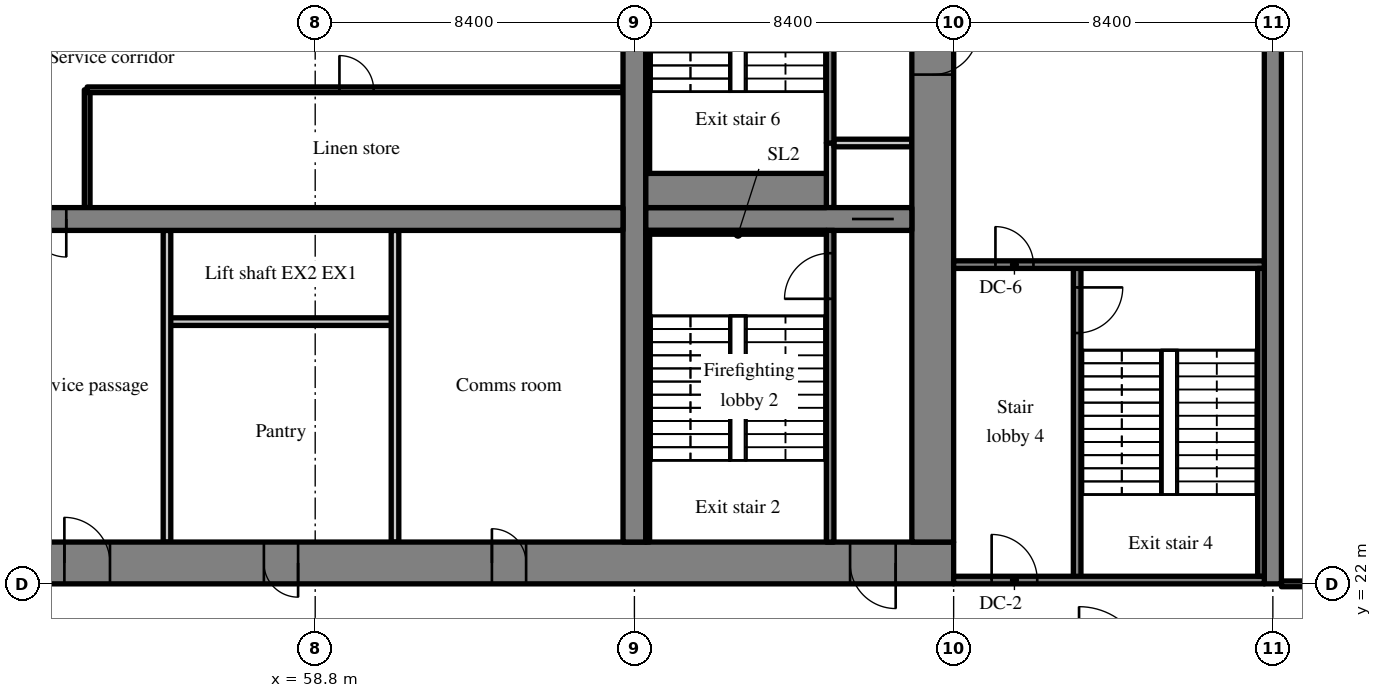
"""IFC4 building model, lengths in metres.
Left out: names, types, materials, properties, quantities, classifications, styles, units other than length and angle.
Written with IfcOpenShell. Run it as: python <this file> out.ifc"""

import sys

from ifc_helpers import new_model, si_unit, direction, frame, frame_2d, origin, place, context, subcontext, project, spatial, rectangle, extrude, source, transform, mapped, element, fill, save


model = new_model("IFC4")
c1 = context("Model", 3, precision=1e-05, world=origin(), true_north=direction((0.0, 1.0)))
c2 = subcontext(c1, "Body", "Model", "MODEL_VIEW")
j1 = project(units=[si_unit("LENGTHUNIT", "METRE"), si_unit("PLANEANGLEUNIT", "RADIAN")], contexts=[c1])
p1 = place(None, origin())
s1 = spatial("IfcSite", under=j1, at=p1, CompositionType="ELEMENT")
p2 = place(p1, origin())
s2 = spatial("IfcBuilding", under=s1, at=p2, CompositionType="ELEMENT")
p3 = place(p2, frame((0.0, 0.0, 23.0)))
s3 = spatial("IfcBuildingStorey", under=s2, at=p3, CompositionType="ELEMENT", Elevation=23.0)
m1 = source(origin(), c2, "Body", "SweptSolid", [
    extrude(rectangle(XDim=50.4, YDim=1.1, at=frame_2d((25.2, 0.0))), origin(), (0.0, 0.0, 1.0), 4.52),
])
p4 = place(p3, frame((25.2, 22.55, 0.0), z_axis=(0.0, 0.0, 1.0), x_axis=(1.0, 0.0, 0.0)))
e1 = element("IfcWall", 1, at=p4, inside=s3, PredefinedType="SHEAR", context=c2, shape_type="MappedRepresentation", body=[
    mapped(m1, transform((0.0, 0.0, 0.0), scale=1.0)),
])
m2 = source(origin(), c2, "Body", "SweptSolid", [
    extrude(rectangle(XDim=1.8, YDim=2.1, at=frame_2d((0.9, 1.05))), frame((0.0, 0.56, 0.0), z_axis=(0.0, -1.0, 0.0), x_axis=(1.0, 0.0, 0.0)), (0.0, 0.0, 1.0), 1.12),
])
p5 = place(p4, frame((15.9, 0.0, 0.0)))
e2 = element("IfcOpeningElement", 2, at=p5, cuts=e1, PredefinedType="OPENING", context=c2, shape_type="MappedRepresentation", body=[
    mapped(m2, transform((0.0, 0.0, 0.0), scale=1.0)),
])
m3 = source(origin(), c2, "Body", "SweptSolid", [
    extrude(rectangle(XDim=1.2, YDim=2.1, at=frame_2d((0.6, 1.05))), frame((0.0, 0.56, 0.0), z_axis=(0.0, -1.0, 0.0), x_axis=(1.0, 0.0, 0.0)), (0.0, 0.0, 1.0), 1.12),
])
p6 = place(p4, frame((27.0, 0.0, 0.0)))
e3 = element("IfcOpeningElement", 3, at=p6, cuts=e1, PredefinedType="OPENING", context=c2, shape_type="MappedRepresentation", body=[
    mapped(m3, transform((0.0, 0.0, 0.0), scale=1.0)),
])
m4 = source(origin(), c2, "Body", "SweptSolid", [
    extrude(rectangle(XDim=0.9, YDim=2.1, at=frame_2d((0.45, 1.05))), frame((0.0, 0.56, 0.0), z_axis=(0.0, -1.0, 0.0), x_axis=(1.0, 0.0, 0.0)), (0.0, 0.0, 1.0), 1.12),
])
p7 = place(p4, frame((32.25, 0.0, 0.0)))
e4 = element("IfcOpeningElement", 4, at=p7, cuts=e1, PredefinedType="OPENING", context=c2, shape_type="MappedRepresentation", body=[
    mapped(m4, transform((0.0, 0.0, 0.0), scale=1.0)),
])
p8 = place(p4, frame((38.25, 0.0, 0.0)))
e5 = element("IfcOpeningElement", 5, at=p8, cuts=e1, PredefinedType="OPENING", context=c2, shape_type="MappedRepresentation", body=[
    mapped(m4, transform((0.0, 0.0, 0.0), scale=1.0)),
])
p9 = place(p4, frame((6.425, 0.0, 0.0)))
e6 = element("IfcOpeningElement", 6, at=p9, cuts=e1, PredefinedType="OPENING", context=c2, shape_type="MappedRepresentation", body=[
    mapped(m3, transform((0.0, 0.0, 0.0), scale=1.0)),
])
p10 = place(p4, frame((47.675, 0.0, 0.0)))
e7 = element("IfcOpeningElement", 7, at=p10, cuts=e1, PredefinedType="OPENING", context=c2, shape_type="MappedRepresentation", body=[
    mapped(m3, transform((0.0, 0.0, 0.0), scale=1.0)),
])
m5 = source(origin(), c2, "Body", "SweptSolid", [
    extrude(rectangle(XDim=17.8, YDim=1.1, at=frame_2d((8.9, 0.0))), origin(), (0.0, 0.0, 1.0), 4.52),
])
p11 = place(p3, frame((75.05, 23.1, 0.0), z_axis=(0.0, 0.0, 1.0), x_axis=(0.0, 1.0, 0.0)))
e8 = element("IfcWall", 8, at=p11, inside=s3, PredefinedType="SHEAR", context=c2, shape_type="MappedRepresentation", body=[
    mapped(m5, transform((0.0, 0.0, 0.0), scale=1.0)),
])
p12 = place(p11, frame((12.3, 0.0, 0.0)))
e9 = element("IfcOpeningElement", 9, at=p12, cuts=e8, PredefinedType="OPENING", context=c2, shape_type="MappedRepresentation", body=[
    mapped(m3, transform((0.0, 0.0, 0.0), scale=1.0)),
])
m6 = source(origin(), c2, "Body", "SweptSolid", [
    extrude(rectangle(XDim=17.8, YDim=0.6, at=frame_2d((8.9, 0.0))), origin(), (0.0, 0.0, 1.0), 4.52),
])
p13 = place(p3, frame((67.2, 23.1, 0.0), z_axis=(0.0, 0.0, 1.0), x_axis=(0.0, 1.0, 0.0)))
e10 = element("IfcWall", 10, at=p13, inside=s3, PredefinedType="SHEAR", context=c2, shape_type="MappedRepresentation", body=[
    mapped(m6, transform((0.0, 0.0, 0.0), scale=1.0)),
])
m7 = source(origin(), c2, "Body", "SweptSolid", [
    extrude(rectangle(XDim=16.2, YDim=0.6, at=frame_2d((8.1, 0.0))), origin(), (0.0, 0.0, 1.0), 4.52),
])
p14 = place(p3, frame((50.7, 31.6, 0.0), z_axis=(0.0, 0.0, 1.0), x_axis=(1.0, 0.0, 0.0)))
e11 = element("IfcWall", 11, at=p14, inside=s3, PredefinedType="SHEAR", context=c2, shape_type="MappedRepresentation", body=[
    mapped(m7, transform((0.0, 0.0, 0.0), scale=1.0)),
])
m8 = source(origin(), c2, "Body", "SweptSolid", [
    extrude(rectangle(XDim=1.0, YDim=2.1, at=frame_2d((0.5, 1.05))), frame((0.0, 0.31, 0.0), z_axis=(0.0, -1.0, 0.0), x_axis=(1.0, 0.0, 0.0)), (0.0, 0.0, 1.0), 0.62),
])
p15 = place(p14, frame((0.55, 0.0, 0.0)))
e12 = element("IfcOpeningElement", 12, at=p15, cuts=e11, PredefinedType="OPENING", context=c2, shape_type="MappedRepresentation", body=[
    mapped(m8, transform((0.0, 0.0, 0.0), scale=1.0)),
])
m9 = source(origin(), c2, "Body", "SweptSolid", [
    extrude(rectangle(XDim=7.0, YDim=0.6, at=frame_2d((3.5, 0.0))), origin(), (0.0, 0.0, 1.0), 4.52),
])
p16 = place(p3, frame((67.5, 31.6, 0.0), z_axis=(0.0, 0.0, 1.0), x_axis=(1.0, 0.0, 0.0)))
e13 = element("IfcWall", 13, at=p16, inside=s3, PredefinedType="SHEAR", context=c2, shape_type="MappedRepresentation", body=[
    mapped(m9, transform((0.0, 0.0, 0.0), scale=1.0)),
])
m10 = source(origin(), c2, "Body", "SweptSolid", [
    extrude(rectangle(XDim=1.1, YDim=2.1, at=frame_2d((0.55, 1.05))), frame((0.0, 0.31, 0.0), z_axis=(0.0, -1.0, 0.0), x_axis=(1.0, 0.0, 0.0)), (0.0, 0.0, 1.0), 0.62),
])
p17 = place(p16, frame((5.425, 0.0, 0.0)))
e14 = element("IfcOpeningElement", 14, at=p17, cuts=e13, PredefinedType="OPENING", context=c2, shape_type="MappedRepresentation", body=[
    mapped(m10, transform((0.0, 0.0, 0.0), scale=1.0)),
])
m11 = source(origin(), c2, "Body", "SweptSolid", [
    extrude(rectangle(XDim=20.0, YDim=0.45, at=frame_2d((10.0, 0.0))), origin(), (0.0, 0.0, 1.0), 4.52),
])
p18 = place(p3, frame((84.0, 22.0, 0.0), z_axis=(0.0, 0.0, 1.0), x_axis=(0.0, 1.0, 0.0)))
e15 = element("IfcWall", 15, at=p18, inside=s3, PredefinedType="SHEAR", context=c2, shape_type="MappedRepresentation", body=[
    mapped(m11, transform((0.0, 0.0, 0.0), scale=1.0)),
])
m12 = source(origin(), c2, "Body", "SweptSolid", [
    extrude(rectangle(XDim=6.0, YDim=0.2, at=frame_2d((3.0, 0.0))), origin(), (0.0, 0.0, 1.0), 4.52),
])
p19 = place(p3, frame((60.9, 28.9, 0.0), z_axis=(0.0, 0.0, 1.0), x_axis=(-1.0, 0.0, 0.0)))
e16 = element("IfcWall", 16, at=p19, inside=s3, PredefinedType="SOLIDWALL", context=c2, shape_type="MappedRepresentation", body=[
    mapped(m12, transform((0.0, 0.0, 0.0), scale=1.0)),
])
m13 = source(origin(), c2, "Body", "SweptSolid", [
    extrude(rectangle(XDim=8.2, YDim=0.2, at=frame_2d((4.1, 0.0))), origin(), (0.0, 0.0, 1.0), 4.52),
])
for number, where, z_axis, x_axis in (
    (17, (54.9, 23.1, 0.0), (0.0, 0.0, 1.0), (0.0, 1.0, 0.0)),
    (18, (60.9, 23.1, 0.0), (0.0, 0.0, 1.0), (0.0, 1.0, 0.0)),
):
    element("IfcWall", number, at=place(p3, frame(where, z_axis=z_axis, x_axis=x_axis)), inside=s3, PredefinedType="PARTITIONING", context=c2, shape_type="MappedRepresentation", body=[
        mapped(m13, transform((0.0, 0.0, 0.0), scale=1.0)),
    ])
m14 = source(origin(), c2, "Body", "SweptSolid", [
    extrude(rectangle(XDim=3.1, YDim=0.15, at=frame_2d((1.55, 0.0))), origin(), (0.0, 0.0, 1.0), 4.52),
])
p20 = place(p3, frame((52.8, 31.9, 0.0), z_axis=(0.0, 0.0, 1.0), x_axis=(0.0, 1.0, 0.0)))
e19 = element("IfcWall", 19, at=p20, inside=s3, PredefinedType="PARTITIONING", context=c2, shape_type="MappedRepresentation", body=[
    mapped(m14, transform((0.0, 0.0, 0.0), scale=1.0)),
])
m15 = source(origin(), c2, "Body", "SweptSolid", [
    extrude(rectangle(XDim=14.1, YDim=0.15, at=frame_2d((7.05, 0.0))), origin(), (0.0, 0.0, 1.0), 4.52),
])
p21 = place(p3, frame((66.9, 35.0, 0.0), z_axis=(0.0, 0.0, 1.0), x_axis=(-1.0, 0.0, 0.0)))
e20 = element("IfcWall", 20, at=p21, inside=s3, PredefinedType="PARTITIONING", context=c2, shape_type="MappedRepresentation", body=[
    mapped(m15, transform((0.0, 0.0, 0.0), scale=1.0)),
])
m16 = source(origin(), c2, "Body", "SweptSolid", [
    extrude(rectangle(XDim=0.9, YDim=2.1, at=frame_2d((0.45, 1.05))), frame((0.0, 0.085, 0.0), z_axis=(0.0, -1.0, 0.0), x_axis=(1.0, 0.0, 0.0)), (0.0, 0.0, 1.0), 0.17),
])
p22 = place(p21, frame((6.562, 0.0, 0.0)))
e21 = element("IfcOpeningElement", 21, at=p22, cuts=e20, PredefinedType="OPENING", context=c2, shape_type="MappedRepresentation", body=[
    mapped(m16, transform((0.0, 0.0, 0.0), scale=1.0)),
])
m17 = source(origin(), c2, "Body", "SweptSolid", [
    extrude(rectangle(XDim=8.2, YDim=0.2, at=frame_2d((4.1, 0.0))), origin(), (0.0, 0.0, 1.0), 4.52),
])
p23 = place(p3, frame((72.35, 23.1, 0.0), z_axis=(0.0, 0.0, 1.0), x_axis=(0.0, 1.0, 0.0)))
e22 = element("IfcWall", 22, at=p23, inside=s3, PredefinedType="SOLIDWALL", context=c2, shape_type="MappedRepresentation", body=[
    mapped(m17, transform((0.0, 0.0, 0.0), scale=1.0)),
])
m18 = source(origin(), c2, "Body", "SweptSolid", [
    extrude(rectangle(XDim=1.2, YDim=2.1, at=frame_2d((0.6, 1.05))), frame((0.0, 0.11, 0.0), z_axis=(0.0, -1.0, 0.0), x_axis=(1.0, 0.0, 0.0)), (0.0, 0.0, 1.0), 0.22),
])
p24 = place(p23, frame((6.4, 0.0, 0.0)))
e23 = element("IfcOpeningElement", 23, at=p24, cuts=e22, PredefinedType="OPENING", context=c2, shape_type="MappedRepresentation", body=[
    mapped(m18, transform((0.0, 0.0, 0.0), scale=1.0)),
])
m19 = source(origin(), c2, "Body", "SweptSolid", [
    extrude(rectangle(XDim=1.7, YDim=0.2, at=frame_2d((0.85, 0.0))), origin(), (0.0, 0.0, 1.0), 4.52),
])
p25 = place(p3, frame((72.35, 31.9, 0.0), z_axis=(0.0, 0.0, 1.0), x_axis=(0.0, 1.0, 0.0)))
e24 = element("IfcWall", 24, at=p25, inside=s3, PredefinedType="SOLIDWALL", context=c2, shape_type="MappedRepresentation", body=[
    mapped(m19, transform((0.0, 0.0, 0.0), scale=1.0)),
])
m20 = source(origin(), c2, "Body", "SweptSolid", [
    extrude(rectangle(XDim=2.05, YDim=0.2, at=frame_2d((1.025, 0.0))), origin(), (0.0, 0.0, 1.0), 4.52),
])
p26 = place(p3, frame((72.45, 33.6, 0.0), z_axis=(0.0, 0.0, 1.0), x_axis=(1.0, 0.0, 0.0)))
e25 = element("IfcWall", 25, at=p26, inside=s3, PredefinedType="SOLIDWALL", context=c2, shape_type="MappedRepresentation", body=[
    mapped(m20, transform((0.0, 0.0, 0.0), scale=1.0)),
])
m21 = source(origin(), c2, "Body", "SweptSolid", [
    extrude(rectangle(XDim=7.3, YDim=0.2, at=frame_2d((3.65, 0.0))), origin(), (0.0, 0.0, 1.0), 4.52),
])
p27 = place(p3, frame((72.35, 33.6, 0.0), z_axis=(0.0, 0.0, 1.0), x_axis=(0.0, 1.0, 0.0)))
e26 = element("IfcWall", 26, at=p27, inside=s3, PredefinedType="SOLIDWALL", context=c2, shape_type="MappedRepresentation", body=[
    mapped(m21, transform((0.0, 0.0, 0.0), scale=1.0)),
])
m22 = source(origin(), c2, "Body", "SweptSolid", [
    extrude(rectangle(XDim=1.8, YDim=2.1, at=frame_2d((0.9, 1.05))), frame((0.0, 0.11, 0.0), z_axis=(0.0, -1.0, 0.0), x_axis=(1.0, 0.0, 0.0)), (0.0, 0.0, 1.0), 0.22),
])
p28 = place(p27, frame((5.3, 0.0, 0.0)))
e27 = element("IfcOpeningElement", 27, at=p28, cuts=e26, PredefinedType="OPENING", context=c2, shape_type="MappedRepresentation", body=[
    mapped(m22, transform((0.0, 0.0, 0.0), scale=1.0)),
])
m23 = source(origin(), c2, "Body", "SweptSolid", [
    extrude(rectangle(XDim=8.3, YDim=0.2, at=frame_2d((4.15, 0.0))), origin(), (0.0, 0.0, 1.0), 4.52),
])
p29 = place(p3, frame((78.85, 22.1, 0.0), z_axis=(0.0, 0.0, 1.0), x_axis=(0.0, 1.0, 0.0)))
e28 = element("IfcWall", 28, at=p29, inside=s3, PredefinedType="SOLIDWALL", context=c2, shape_type="MappedRepresentation", body=[
    mapped(m23, transform((0.0, 0.0, 0.0), scale=1.0)),
])
p30 = place(p29, frame((6.5, 0.0, 0.0)))
e29 = element("IfcOpeningElement", 29, at=p30, cuts=e28, PredefinedType="OPENING", context=c2, shape_type="MappedRepresentation", body=[
    mapped(m18, transform((0.0, 0.0, 0.0), scale=1.0)),
])
m24 = source(origin(), c2, "Body", "SweptSolid", [
    extrude(rectangle(XDim=8.175, YDim=0.2, at=frame_2d((4.087, 0.0))), origin(), (0.0, 0.0, 1.0), 4.52),
])
p31 = place(p3, frame((83.775, 22.1, 0.0), z_axis=(0.0, 0.0, 1.0), x_axis=(-1.0, 0.0, 0.0)))
e30 = element("IfcWall", 30, at=p31, inside=s3, PredefinedType="SOLIDWALL", context=c2, shape_type="MappedRepresentation", body=[
    mapped(m24, transform((0.0, 0.0, 0.0), scale=1.0)),
])
p32 = place(p31, frame((5.975, 0.0, 0.0)))
e31 = element("IfcOpeningElement", 31, at=p32, cuts=e30, PredefinedType="OPENING", context=c2, shape_type="MappedRepresentation", body=[
    mapped(m18, transform((0.0, 0.0, 0.0), scale=1.0)),
])
p33 = place(p3, frame((83.775, 30.4, 0.0), z_axis=(0.0, 0.0, 1.0), x_axis=(-1.0, 0.0, 0.0)))
e32 = element("IfcWall", 32, at=p33, inside=s3, PredefinedType="SOLIDWALL", context=c2, shape_type="MappedRepresentation", body=[
    mapped(m24, transform((0.0, 0.0, 0.0), scale=1.0)),
])
m25 = source(origin(), c2, "Body", "SweptSolid", [
    extrude(rectangle(XDim=1.0, YDim=2.1, at=frame_2d((0.5, 1.05))), frame((0.0, 0.11, 0.0), z_axis=(0.0, -1.0, 0.0), x_axis=(1.0, 0.0, 0.0)), (0.0, 0.0, 1.0), 0.22),
])
p34 = place(p33, frame((6.075, 0.0, 0.0)))
e33 = element("IfcOpeningElement", 33, at=p34, cuts=e32, PredefinedType="OPENING", context=c2, shape_type="MappedRepresentation", body=[
    mapped(m25, transform((0.0, 0.0, 0.0), scale=1.0)),
])
m26 = source(origin(), c2, "Body", "SweptSolid", [
    extrude(rectangle(XDim=4.75, YDim=0.1, at=frame_2d((2.375, 0.0))), origin(), (0.0, 0.0, 1.0), 4.52),
])
p35 = place(p3, frame((67.5, 31.25, 0.0), z_axis=(0.0, 0.0, 1.0), x_axis=(1.0, 0.0, 0.0)))
e34 = element("IfcWall", 34, at=p35, inside=s3, PredefinedType="SOLIDWALL", context=c2, shape_type="MappedRepresentation", body=[
    mapped(m26, transform((0.0, 0.0, 0.0), scale=1.0)),
])
m27 = source(origin(), c2, "Body", "SweptSolid", [
    extrude(rectangle(XDim=8.1, YDim=0.1, at=frame_2d((4.05, 0.0))), origin(), (0.0, 0.0, 1.0), 4.52),
])
p36 = place(p3, frame((67.55, 23.1, 0.0), z_axis=(0.0, 0.0, 1.0), x_axis=(0.0, 1.0, 0.0)))
e35 = element("IfcWall", 35, at=p36, inside=s3, PredefinedType="SOLIDWALL", context=c2, shape_type="MappedRepresentation", body=[
    mapped(m27, transform((0.0, 0.0, 0.0), scale=1.0)),
])
m28 = source(origin(), c2, "Body", "SweptSolid", [
    extrude(rectangle(XDim=4.75, YDim=0.9, at=frame_2d((2.375, 0.0))), origin(), (0.0, 0.0, 1.0), 4.52),
])
p37 = place(p3, frame((67.5, 32.35, 0.0), z_axis=(0.0, 0.0, 1.0), x_axis=(1.0, 0.0, 0.0)))
e36 = element("IfcWall", 36, at=p37, inside=s3, PredefinedType="SOLIDWALL", context=c2, shape_type="MappedRepresentation", body=[
    mapped(m28, transform((0.0, 0.0, 0.0), scale=1.0)),
])
p38 = place(p3, frame((67.55, 32.8, 0.0), z_axis=(0.0, 0.0, 1.0), x_axis=(0.0, 1.0, 0.0)))
e37 = element("IfcWall", 37, at=p38, inside=s3, PredefinedType="SOLIDWALL", context=c2, shape_type="MappedRepresentation", body=[
    mapped(m27, transform((0.0, 0.0, 0.0), scale=1.0)),
])
m29 = source(origin(), c2, "Body", "SweptSolid", [
    extrude(rectangle(XDim=8.1, YDim=0.175, at=frame_2d((4.05, 0.0))), origin(), (0.0, 0.0, 1.0), 4.52),
])
p39 = place(p3, frame((83.688, 22.2, 0.0), z_axis=(0.0, 0.0, 1.0), x_axis=(0.0, 1.0, 0.0)))
e38 = element("IfcWall", 38, at=p39, inside=s3, PredefinedType="SOLIDWALL", context=c2, shape_type="MappedRepresentation", body=[
    mapped(m29, transform((0.0, 0.0, 0.0), scale=1.0)),
])
m30 = source(origin(), c2, "Body", "SweptSolid", [
    extrude(rectangle(XDim=3.9, YDim=0.15, at=frame_2d((1.95, 0.0))), origin(), (0.0, 0.0, 1.0), 3.82),
])
p40 = place(p3, frame((84.225, 22.0, 0.0), z_axis=(0.0, 0.0, 1.0), x_axis=(1.0, 0.0, 0.0)))
e39 = element("IfcWall", 39, at=p40, inside=s3, PredefinedType="PARTITIONING", context=c2, shape_type="MappedRepresentation", body=[
    mapped(m30, transform((0.0, 0.0, 0.0), scale=1.0)),
])
m31 = source(origin(), c2, "Body", "SweptSolid", [
    extrude(rectangle(XDim=1.0, YDim=2.1, at=frame_2d((0.5, 1.05))), frame((0.0, 0.085, 0.0), z_axis=(0.0, -1.0, 0.0), x_axis=(1.0, 0.0, 0.0)), (0.0, 0.0, 1.0), 0.17),
])
p41 = place(p40, frame((1.45, 0.0, 0.0)))
e40 = element("IfcOpeningElement", 40, at=p41, cuts=e39, PredefinedType="OPENING", context=c2, shape_type="MappedRepresentation", body=[
    mapped(m31, transform((0.0, 0.0, 0.0), scale=1.0)),
])
m32 = source(origin(), c2, "Body", "SweptSolid", [
    extrude(rectangle(XDim=1.2, YDim=2.1, at=frame_2d((0.6, 1.05))), frame((0.0, 0.325, 0.0), z_axis=(0.0, -1.0, 0.0), x_axis=(1.0, 0.0, 0.0)), (0.0, 0.0, 1.0), 0.05),
])
p42 = place(p6, origin())
e41 = element("IfcDoor", 41, at=p42, inside=s3, OperationType="SINGLE_SWING_LEFT", PredefinedType="DOOR", context=c2, shape_type="MappedRepresentation", body=[
    mapped(m32, transform((0.0, 0.0, 0.0), scale=1.0)),
])
fill(e3, e41)
m33 = source(origin(), c2, "Body", "SweptSolid", [
    extrude(rectangle(XDim=1.0, YDim=2.1, at=frame_2d((0.5, 1.05))), frame((0.0, 0.025, 0.0), z_axis=(0.0, -1.0, 0.0), x_axis=(1.0, 0.0, 0.0)), (0.0, 0.0, 1.0), 0.05),
])
p43 = place(p15, origin())
e42 = element("IfcDoor", 42, at=p43, inside=s3, OperationType="SINGLE_SWING_RIGHT", PredefinedType="DOOR", context=c2, shape_type="MappedRepresentation", body=[
    mapped(m33, transform((0.0, 0.0, 0.0), scale=1.0)),
])
fill(e12, e42)
m34 = source(origin(), c2, "Body", "SweptSolid", [
    extrude(rectangle(XDim=0.9, YDim=2.1, at=frame_2d((0.45, 1.05))), frame((0.0, 0.325, 0.0), z_axis=(0.0, -1.0, 0.0), x_axis=(1.0, 0.0, 0.0)), (0.0, 0.0, 1.0), 0.05),
])
p44 = place(p7, origin())
e43 = element("IfcDoor", 43, at=p44, inside=s3, OperationType="SINGLE_SWING_RIGHT", PredefinedType="DOOR", context=c2, shape_type="MappedRepresentation", body=[
    mapped(m34, transform((0.0, 0.0, 0.0), scale=1.0)),
])
fill(e4, e43)
p45 = place(p8, origin())
e44 = element("IfcDoor", 44, at=p45, inside=s3, OperationType="SINGLE_SWING_LEFT", PredefinedType="DOOR", context=c2, shape_type="MappedRepresentation", body=[
    mapped(m34, transform((0.0, 0.0, 0.0), scale=1.0)),
])
fill(e5, e44)
m35 = source(origin(), c2, "Body", "SweptSolid", [
    extrude(rectangle(XDim=0.9, YDim=2.1, at=frame_2d((0.45, 1.05))), frame((0.0, 0.025, 0.0), z_axis=(0.0, -1.0, 0.0), x_axis=(1.0, 0.0, 0.0)), (0.0, 0.0, 1.0), 0.05),
])
p46 = place(p22, origin())
e45 = element("IfcDoor", 45, at=p46, inside=s3, OperationType="SINGLE_SWING_RIGHT", PredefinedType="DOOR", context=c2, shape_type="MappedRepresentation", body=[
    mapped(m35, transform((0.0, 0.0, 0.0), scale=1.0)),
])
fill(e21, e45)
m36 = source(origin(), c2, "Body", "SweptSolid", [
    extrude(rectangle(XDim=1.2, YDim=2.1, at=frame_2d((0.6, 1.05))), frame((0.0, 0.025, 0.0), z_axis=(0.0, -1.0, 0.0), x_axis=(1.0, 0.0, 0.0)), (0.0, 0.0, 1.0), 0.05),
])
p47 = place(p24, origin())
e46 = element("IfcDoor", 46, at=p47, inside=s3, OperationType="SINGLE_SWING_LEFT", PredefinedType="DOOR", context=c2, shape_type="MappedRepresentation", body=[
    mapped(m36, transform((0.0, 0.0, 0.0), scale=1.0)),
])
fill(e23, e46)
p48 = place(p10, origin())
e47 = element("IfcDoor", 47, at=p48, inside=s3, OperationType="SINGLE_SWING_RIGHT", PredefinedType="DOOR", context=c2, shape_type="MappedRepresentation", body=[
    mapped(m32, transform((0.0, 0.0, 0.0), scale=1.0)),
])
fill(e7, e47)
m37 = source(origin(), c2, "Body", "SweptSolid", [
    extrude(rectangle(XDim=1.1, YDim=2.1, at=frame_2d((0.55, 1.05))), frame((0.0, 0.025, 0.0), z_axis=(0.0, -1.0, 0.0), x_axis=(1.0, 0.0, 0.0)), (0.0, 0.0, 1.0), 0.05),
])
p49 = place(p17, origin())
e48 = element("IfcDoor", 48, at=p49, inside=s3, OperationType="SLIDING_TO_RIGHT", PredefinedType="DOOR", context=c2, shape_type="MappedRepresentation", body=[
    mapped(m37, transform((0.0, 0.0, 0.0), scale=1.0)),
])
fill(e14, e48)
p50 = place(p12, origin())
e49 = element("IfcDoor", 49, at=p50, inside=s3, OperationType="SINGLE_SWING_RIGHT", PredefinedType="DOOR", context=c2, shape_type="MappedRepresentation", body=[
    mapped(m36, transform((0.0, 0.0, 0.0), scale=1.0)),
])
fill(e9, e49)
p51 = place(p30, origin())
e50 = element("IfcDoor", 50, at=p51, inside=s3, OperationType="SINGLE_SWING_RIGHT", PredefinedType="DOOR", context=c2, shape_type="MappedRepresentation", body=[
    mapped(m36, transform((0.0, 0.0, 0.0), scale=1.0)),
])
fill(e29, e50)
p52 = place(p32, origin())
e51 = element("IfcDoor", 51, at=p52, inside=s3, OperationType="SINGLE_SWING_RIGHT", PredefinedType="DOOR", context=c2, shape_type="MappedRepresentation", body=[
    mapped(m36, transform((0.0, 0.0, 0.0), scale=1.0)),
])
fill(e31, e51)
p53 = place(p34, origin())
e52 = element("IfcDoor", 52, at=p53, inside=s3, OperationType="SINGLE_SWING_RIGHT", PredefinedType="DOOR", context=c2, shape_type="MappedRepresentation", body=[
    mapped(m33, transform((0.0, 0.0, 0.0), scale=1.0)),
])
fill(e33, e52)
save(model, sys.argv[1])
